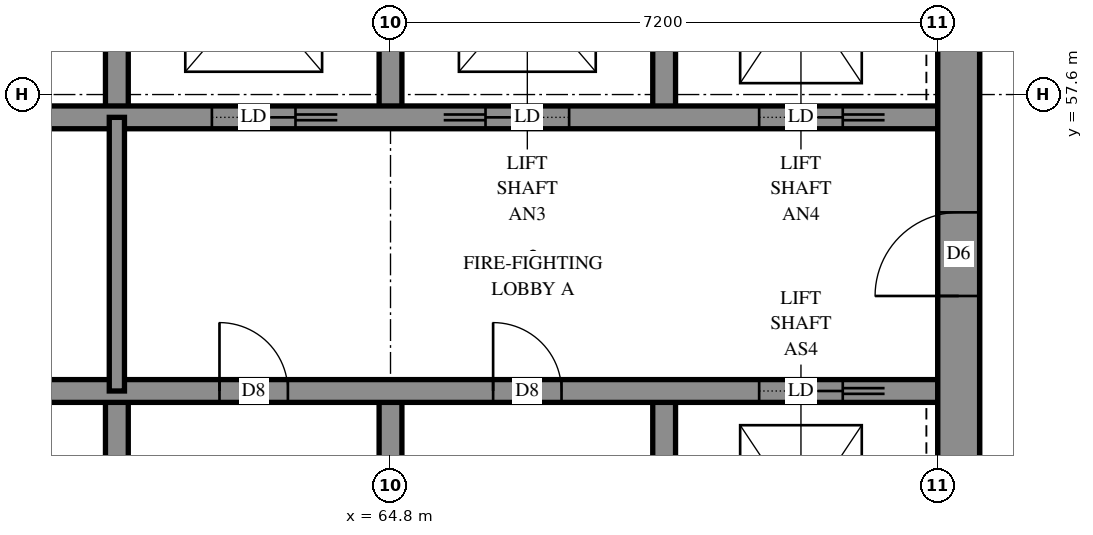
"""IFC4 building model, lengths in metres.
Left out: names, types, materials, properties, quantities, classifications, styles, units other than length and angle.
Written with IfcOpenShell. Run it as: python <this file> out.ifc"""

import sys

from ifc_helpers import new_model, si_unit, direction, frame, frame_2d, origin, place, context, subcontext, project, spatial, rectangle, extrude, element, fill, save


model = new_model("IFC4")
c1 = context("Model", 3, precision=1e-05, world=origin(), true_north=direction((0.0, 1.0)))
c2 = subcontext(c1, "Body", "Model", "MODEL_VIEW")
j1 = project(units=[si_unit("LENGTHUNIT", "METRE"), si_unit("PLANEANGLEUNIT", "RADIAN")], contexts=[c1])
p1 = place(None, origin())
s1 = spatial("IfcSite", under=j1, at=p1, CompositionType="ELEMENT")
p2 = place(p1, origin())
s2 = spatial("IfcBuilding", under=s1, at=p2, CompositionType="ELEMENT")
p3 = place(p2, frame((0.0, 0.0, 176.2)))
s3 = spatial("IfcBuildingStorey", under=s2, at=p3, CompositionType="ELEMENT", Elevation=176.2)
p4 = place(p3, frame((72.275, 50.4, -0.3), z_axis=(0.0, 0.0, 1.0), x_axis=(0.0, 1.0, 0.0)))
e1 = element("IfcWall", 1, at=p4, inside=s3, PredefinedType="SHEAR", context=c2, shape_type="SweptSolid", body=[
    extrude(rectangle(XDim=14.4, YDim=0.55, at=frame_2d((7.2, 0.0))), origin(), (0.0, 0.0, 1.0), 3.5),
])
p5 = place(p4, frame((4.55, 0.0, 0.3)))
e2 = element("IfcOpeningElement", 2, at=p5, cuts=e1, PredefinedType="OPENING", context=c2, shape_type="SweptSolid", body=[
    extrude(rectangle(XDim=1.1, YDim=2.1, at=frame_2d((0.55, 1.05))), frame((0.0, 0.285, 0.0), z_axis=(0.0, -1.0, 0.0), x_axis=(1.0, 0.0, 0.0)), (0.0, 0.0, 1.0), 0.57),
])
p6 = place(p4, frame((11.35, 0.0, 0.3)))
e3 = element("IfcOpeningElement", 3, at=p6, cuts=e1, PredefinedType="OPENING", context=c2, shape_type="SweptSolid", body=[
    extrude(rectangle(XDim=1.1, YDim=2.1, at=frame_2d((0.55, 1.05))), frame((0.0, 0.285, 0.0), z_axis=(0.0, -1.0, 0.0), x_axis=(1.0, 0.0, 0.0)), (0.0, 0.0, 1.0), 0.57),
])
for number, where, z_axis, x_axis in (
    (4, (61.2, 50.4, 0.0), (0.0, 0.0, 1.0), (0.0, 1.0, 0.0)),
    (5, (61.2, 57.3, 0.0), (0.0, 0.0, 1.0), (0.0, 1.0, 0.0)),
    (6, (64.8, 50.4, 0.0), (0.0, 0.0, 1.0), (0.0, 1.0, 0.0)),
    (7, (64.8, 57.3, 0.0), (0.0, 0.0, 1.0), (0.0, 1.0, 0.0)),
    (8, (68.4, 50.4, 0.0), (0.0, 0.0, 1.0), (0.0, 1.0, 0.0)),
    (9, (68.4, 57.3, 0.0), (0.0, 0.0, 1.0), (0.0, 1.0, 0.0)),
):
    element("IfcWall", number, at=place(p3, frame(where, z_axis=z_axis, x_axis=x_axis)), inside=s3, PredefinedType="SOLIDWALL", context=c2, shape_type="SweptSolid", body=[
        extrude(rectangle(XDim=3.3, YDim=0.3, at=frame_2d((1.65, 0.0))), origin(), (0.0, 0.0, 1.0), 3.9),
    ])
p7 = place(p3, frame((57.6, 53.7, 0.0), z_axis=(0.0, 0.0, 1.0), x_axis=(1.0, 0.0, 0.0)))
e10 = element("IfcWall", 10, at=p7, inside=s3, PredefinedType="SOLIDWALL", context=c2, shape_type="SweptSolid", body=[
    extrude(rectangle(XDim=14.4, YDim=0.3, at=frame_2d((7.2, 0.0))), origin(), (0.0, 0.0, 1.0), 3.9),
])
p8 = place(p7, frame((1.35, 0.0, 0.0)))
e11 = element("IfcOpeningElement", 11, at=p8, cuts=e10, PredefinedType="OPENING", context=c2, shape_type="SweptSolid", body=[
    extrude(rectangle(XDim=0.9, YDim=2.1, at=frame_2d((0.45, 1.05))), frame((0.0, 0.16, 0.0), z_axis=(0.0, -1.0, 0.0), x_axis=(1.0, 0.0, 0.0)), (0.0, 0.0, 1.0), 0.32),
])
p9 = place(p7, frame((4.95, 0.0, 0.0)))
e12 = element("IfcOpeningElement", 12, at=p9, cuts=e10, PredefinedType="OPENING", context=c2, shape_type="SweptSolid", body=[
    extrude(rectangle(XDim=0.9, YDim=2.1, at=frame_2d((0.45, 1.05))), frame((0.0, 0.16, 0.0), z_axis=(0.0, -1.0, 0.0), x_axis=(1.0, 0.0, 0.0)), (0.0, 0.0, 1.0), 0.32),
])
p10 = place(p7, frame((8.55, 0.0, 0.0)))
e13 = element("IfcOpeningElement", 13, at=p10, cuts=e10, PredefinedType="OPENING", context=c2, shape_type="SweptSolid", body=[
    extrude(rectangle(XDim=0.9, YDim=2.1, at=frame_2d((0.45, 1.05))), frame((0.0, 0.16, 0.0), z_axis=(0.0, -1.0, 0.0), x_axis=(1.0, 0.0, 0.0)), (0.0, 0.0, 1.0), 0.32),
])
p11 = place(p7, frame((12.05, 0.0, 0.0)))
e14 = element("IfcOpeningElement", 14, at=p11, cuts=e10, PredefinedType="OPENING", context=c2, shape_type="SweptSolid", body=[
    extrude(rectangle(XDim=1.1, YDim=2.1, at=frame_2d((0.55, 1.05))), frame((0.0, 0.16, 0.0), z_axis=(0.0, -1.0, 0.0), x_axis=(1.0, 0.0, 0.0)), (0.0, 0.0, 1.0), 0.32),
])
p12 = place(p3, frame((57.6, 57.3, 0.0), z_axis=(0.0, 0.0, 1.0), x_axis=(1.0, 0.0, 0.0)))
e15 = element("IfcWall", 15, at=p12, inside=s3, PredefinedType="SOLIDWALL", context=c2, shape_type="SweptSolid", body=[
    extrude(rectangle(XDim=14.4, YDim=0.3, at=frame_2d((7.2, 0.0))), origin(), (0.0, 0.0, 1.0), 3.9),
])
p13 = place(p12, frame((1.25, 0.0, 0.0)))
e16 = element("IfcOpeningElement", 16, at=p13, cuts=e15, PredefinedType="OPENING", context=c2, shape_type="SweptSolid", body=[
    extrude(rectangle(XDim=1.1, YDim=2.1, at=frame_2d((0.55, 1.05))), frame((0.0, 0.16, 0.0), z_axis=(0.0, -1.0, 0.0), x_axis=(1.0, 0.0, 0.0)), (0.0, 0.0, 1.0), 0.32),
])
p14 = place(p12, frame((4.85, 0.0, 0.0)))
e17 = element("IfcOpeningElement", 17, at=p14, cuts=e15, PredefinedType="OPENING", context=c2, shape_type="SweptSolid", body=[
    extrude(rectangle(XDim=1.1, YDim=2.1, at=frame_2d((0.55, 1.05))), frame((0.0, 0.16, 0.0), z_axis=(0.0, -1.0, 0.0), x_axis=(1.0, 0.0, 0.0)), (0.0, 0.0, 1.0), 0.32),
])
p15 = place(p12, frame((8.45, 0.0, 0.0)))
e18 = element("IfcOpeningElement", 18, at=p15, cuts=e15, PredefinedType="OPENING", context=c2, shape_type="SweptSolid", body=[
    extrude(rectangle(XDim=1.1, YDim=2.1, at=frame_2d((0.55, 1.05))), frame((0.0, 0.16, 0.0), z_axis=(0.0, -1.0, 0.0), x_axis=(1.0, 0.0, 0.0)), (0.0, 0.0, 1.0), 0.32),
])
p16 = place(p12, frame((12.05, 0.0, 0.0)))
e19 = element("IfcOpeningElement", 19, at=p16, cuts=e15, PredefinedType="OPENING", context=c2, shape_type="SweptSolid", body=[
    extrude(rectangle(XDim=1.1, YDim=2.1, at=frame_2d((0.55, 1.05))), frame((0.0, 0.16, 0.0), z_axis=(0.0, -1.0, 0.0), x_axis=(1.0, 0.0, 0.0)), (0.0, 0.0, 1.0), 0.32),
])
p17 = place(p3, frame((61.2, 53.7, 0.0), z_axis=(0.0, 0.0, 1.0), x_axis=(0.0, 1.0, 0.0)))
e20 = element("IfcWall", 20, at=p17, inside=s3, PredefinedType="PARTITIONING", context=c2, shape_type="SweptSolid", body=[
    extrude(rectangle(XDim=3.6, YDim=0.2, at=frame_2d((1.8, 0.0))), origin(), (0.0, 0.0, 1.0), 3.9),
])
p18 = place(p5, origin())
e21 = element("IfcDoor", 21, at=p18, inside=s3, OperationType="DOUBLE_DOOR_SINGLE_SWING", PredefinedType="DOOR", context=c2, shape_type="SweptSolid", body=[
    extrude(rectangle(XDim=1.1, YDim=2.1, at=frame_2d((0.55, 1.05))), frame((0.0, 0.025, 0.0), z_axis=(0.0, -1.0, 0.0), x_axis=(1.0, 0.0, 0.0)), (0.0, 0.0, 1.0), 0.05),
])
fill(e2, e21)
p19 = place(p9, origin())
e22 = element("IfcDoor", 22, at=p19, inside=s3, OperationType="SINGLE_SWING_LEFT", PredefinedType="DOOR", context=c2, shape_type="SweptSolid", body=[
    extrude(rectangle(XDim=0.9, YDim=2.1, at=frame_2d((0.45, 1.05))), frame((0.0, 0.025, 0.0), z_axis=(0.0, -1.0, 0.0), x_axis=(1.0, 0.0, 0.0)), (0.0, 0.0, 1.0), 0.05),
])
fill(e12, e22)
p20 = place(p10, origin())
e23 = element("IfcDoor", 23, at=p20, inside=s3, OperationType="SINGLE_SWING_LEFT", PredefinedType="DOOR", context=c2, shape_type="SweptSolid", body=[
    extrude(rectangle(XDim=0.9, YDim=2.1, at=frame_2d((0.45, 1.05))), frame((0.0, 0.025, 0.0), z_axis=(0.0, -1.0, 0.0), x_axis=(1.0, 0.0, 0.0)), (0.0, 0.0, 1.0), 0.05),
])
fill(e13, e23)
p21 = place(p11, origin())
e24 = element("IfcDoor", 24, at=p21, inside=s3, OperationType="SLIDING_TO_RIGHT", PredefinedType="DOOR", context=c2, shape_type="SweptSolid", body=[
    extrude(rectangle(XDim=1.1, YDim=2.1, at=frame_2d((0.55, 1.05))), frame((0.0, 0.025, 0.0), z_axis=(0.0, -1.0, 0.0), x_axis=(1.0, 0.0, 0.0)), (0.0, 0.0, 1.0), 0.05),
])
fill(e14, e24)
p22 = place(p14, origin())
e25 = element("IfcDoor", 25, at=p22, inside=s3, OperationType="SLIDING_TO_RIGHT", PredefinedType="DOOR", context=c2, shape_type="SweptSolid", body=[
    extrude(rectangle(XDim=1.1, YDim=2.1, at=frame_2d((0.55, 1.05))), frame((0.0, 0.025, 0.0), z_axis=(0.0, -1.0, 0.0), x_axis=(1.0, 0.0, 0.0)), (0.0, 0.0, 1.0), 0.05),
])
fill(e17, e25)
p23 = place(p15, origin())
e26 = element("IfcDoor", 26, at=p23, inside=s3, OperationType="SLIDING_TO_LEFT", PredefinedType="DOOR", context=c2, shape_type="SweptSolid", body=[
    extrude(rectangle(XDim=1.1, YDim=2.1, at=frame_2d((0.55, 1.05))), frame((0.0, 0.025, 0.0), z_axis=(0.0, -1.0, 0.0), x_axis=(1.0, 0.0, 0.0)), (0.0, 0.0, 1.0), 0.05),
])
fill(e18, e26)
p24 = place(p16, origin())
e27 = element("IfcDoor", 27, at=p24, inside=s3, OperationType="SLIDING_TO_RIGHT", PredefinedType="DOOR", context=c2, shape_type="SweptSolid", body=[
    extrude(rectangle(XDim=1.1, YDim=2.1, at=frame_2d((0.55, 1.05))), frame((0.0, 0.025, 0.0), z_axis=(0.0, -1.0, 0.0), x_axis=(1.0, 0.0, 0.0)), (0.0, 0.0, 1.0), 0.05),
])
fill(e19, e27)
save(model, sys.argv[1])
